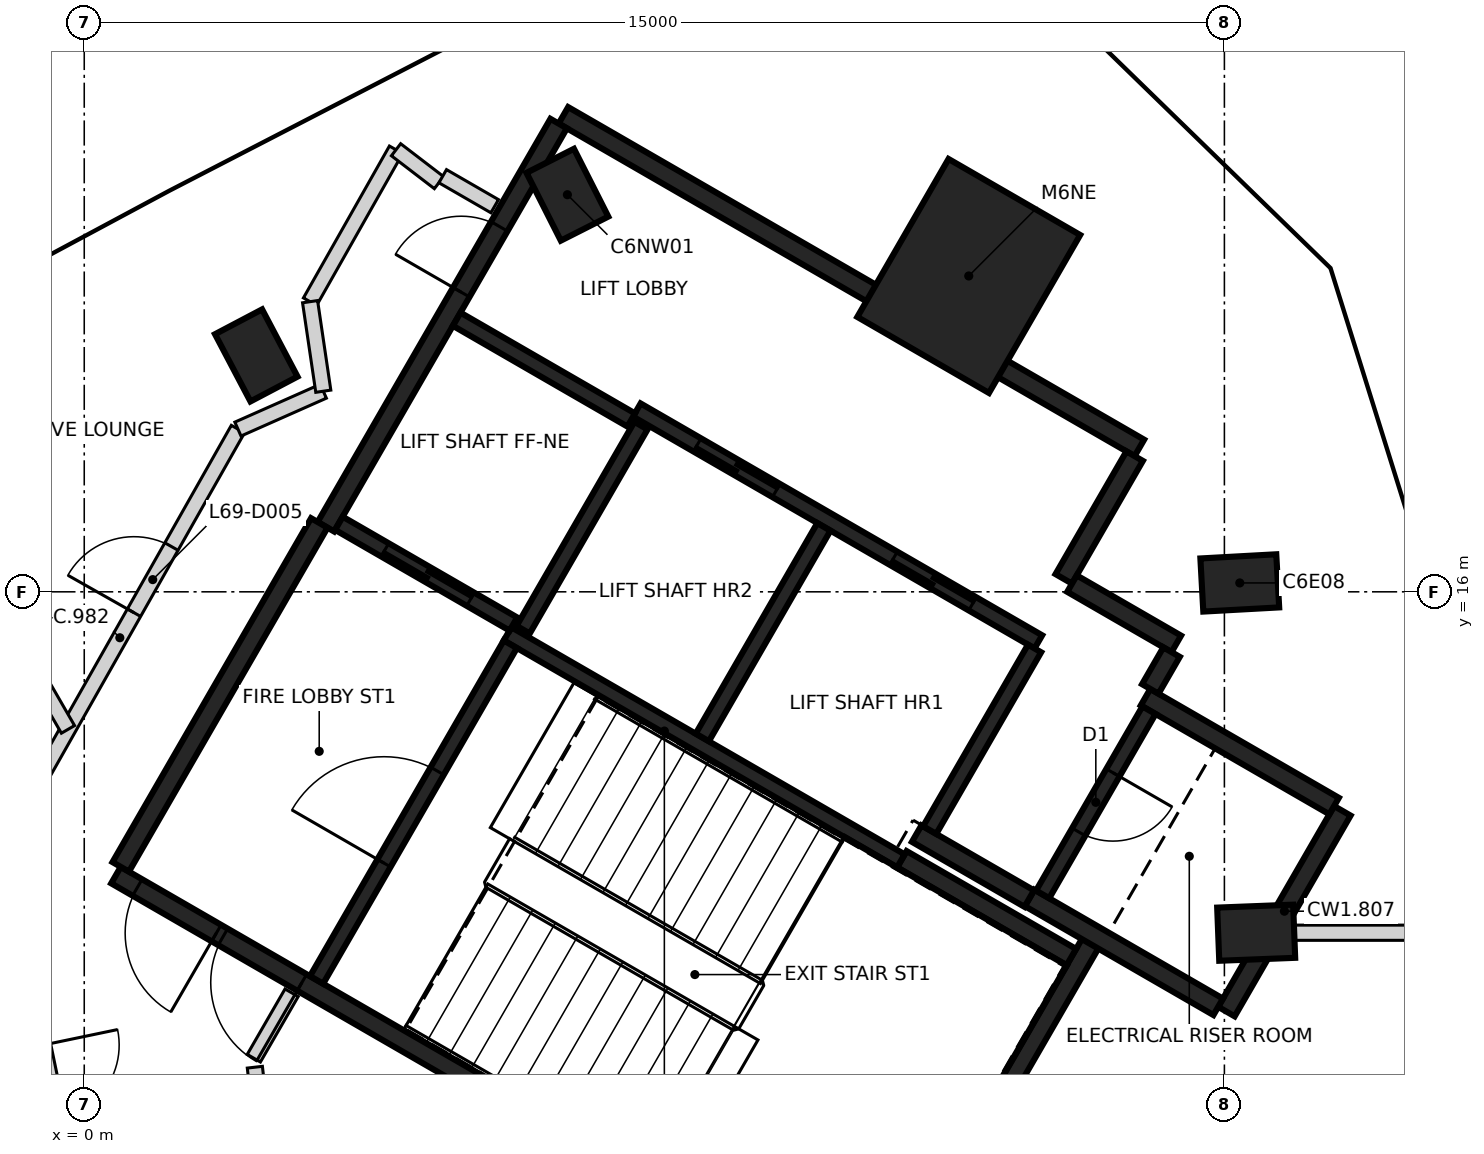
"""IFC4 building model, lengths in metres.
Left out: names, types, materials, properties, quantities, classifications, styles, units other than length and angle.
Written with IfcOpenShell. Run it as: python <this file> out.ifc"""

import sys

from ifc_helpers import new_model, si_unit, direction, frame, frame_2d, origin, origin_2d, place, context, subcontext, project, spatial, rectangle, extrude, element, fill, save


model = new_model("IFC4")
c1 = context("Model", 3, precision=1e-05, world=origin(), true_north=direction((0.0, 1.0)))
c2 = subcontext(c1, "Body", "Model", "MODEL_VIEW")
j1 = project(units=[si_unit("LENGTHUNIT", "METRE"), si_unit("PLANEANGLEUNIT", "RADIAN")], contexts=[c1])
p1 = place(None, origin())
s1 = spatial("IfcSite", under=j1, at=p1, CompositionType="ELEMENT")
p2 = place(p1, origin())
s2 = spatial("IfcBuilding", under=s1, at=p2, CompositionType="ELEMENT")
p3 = place(p2, frame((0.0, 0.0, 273.0)))
s3 = spatial("IfcBuildingStorey", under=s2, at=p3, CompositionType="ELEMENT", Elevation=273.0)
for number, where, z_axis, x_axis in (
    (1, (15.418, 11.515, -0.35), (0.0, 0.0, 1.0), (0.999, 0.039, 0.0)),
    (2, (15.202, 16.117, -0.35), (0.0, 0.0, 1.0), (0.998, 0.055, 0.0)),
    (3, (6.356, 21.224, -0.35), (0.0, 0.0, 1.0), (-0.452, 0.892, 0.0)),
    (4, (2.263, 19.11, -0.35), (0.0, 0.0, 1.0), (-0.466, 0.885, 0.0)),
):
    element("IfcColumn", number, at=place(p3, frame(where, z_axis=z_axis, x_axis=x_axis)), inside=s3, PredefinedType="COLUMN", context=c2, shape_type="SweptSolid", body=[
        extrude(rectangle(XDim=1.0, YDim=0.7, at=origin_2d()), origin(), (0.0, 0.0, 1.0), 3.6),
    ])
p4 = place(p3, frame((11.637, 20.155, -0.35), z_axis=(0.0, 0.0, 1.0), x_axis=(0.5, 0.866025403784, 0.0)))
e5 = element("IfcColumn", 5, at=p4, inside=s3, PredefinedType="COLUMN", context=c2, shape_type="SweptSolid", body=[
    extrude(rectangle(XDim=2.4, YDim=2.0, at=origin_2d()), origin(), (0.0, 0.0, 1.0), 3.6),
])
p5 = place(p3, frame((10.42, 6.498, 0.0), z_axis=(0.0, 0.0, 1.0), x_axis=(-0.866021906294, 0.500006057782, 0.0)))
e6 = element("IfcWall", 6, at=p5, inside=s3, PredefinedType="SHEAR", context=c2, shape_type="SweptSolid", body=[
    extrude(rectangle(XDim=11.55, YDim=0.25, at=frame_2d((5.775, 0.0))), origin(), (0.0, 0.0, 1.0), 3.25),
])
p6 = place(p5, frame((10.025, 0.0, 0.0)))
e7 = element("IfcOpeningElement", 7, at=p6, cuts=e6, PredefinedType="OPENING", context=c2, shape_type="SweptSolid", body=[
    extrude(rectangle(XDim=1.2, YDim=2.1, at=frame_2d((0.6, 1.05))), frame((0.0, 0.135, 0.0), z_axis=(0.0, -1.0, 0.0), x_axis=(1.0, 0.0, 0.0)), (0.0, 0.0, 1.0), 0.27),
])
p7 = place(p5, frame((8.725, 0.0, 0.0)))
e8 = element("IfcOpeningElement", 8, at=p7, cuts=e6, PredefinedType="OPENING", context=c2, shape_type="SweptSolid", body=[
    extrude(rectangle(XDim=1.2, YDim=2.1, at=frame_2d((0.6, 1.05))), frame((0.0, 0.135, 0.0), z_axis=(0.0, -1.0, 0.0), x_axis=(1.0, 0.0, 0.0)), (0.0, 0.0, 1.0), 0.27),
])
p8 = place(p3, frame((6.304, 22.269, 0.0), z_axis=(0.0, 0.0, 1.0), x_axis=(0.866022959057, -0.500004234368, 0.0)))
e9 = element("IfcWall", 9, at=p8, inside=s3, PredefinedType="SHEAR", context=c2, shape_type="SweptSolid", body=[
    extrude(rectangle(XDim=8.75, YDim=0.25, at=frame_2d((4.375, 0.0))), origin(), (0.0, 0.0, 1.0), 3.25),
])
p9 = place(p3, frame((3.179, 16.856, 0.0), z_axis=(0.0, 0.0, 1.0), x_axis=(0.500001955336, 0.866024274868, 0.0)))
e10 = element("IfcWall", 10, at=p9, inside=s3, PredefinedType="SHEAR", context=c2, shape_type="SweptSolid", body=[
    extrude(rectangle(XDim=6.125, YDim=0.25, at=frame_2d((3.062, 0.0))), origin(), (0.0, 0.0, 1.0), 3.25),
])
p10 = place(p9, frame((3.563, 0.0, 0.0)))
e11 = element("IfcOpeningElement", 11, at=p10, cuts=e10, PredefinedType="OPENING", context=c2, shape_type="SweptSolid", body=[
    extrude(rectangle(XDim=1.0, YDim=2.1, at=frame_2d((0.5, 1.05))), frame((0.0, 0.135, 0.0), z_axis=(0.0, -1.0, 0.0), x_axis=(1.0, 0.0, 0.0)), (0.0, 0.0, 1.0), 0.27),
])
p11 = place(p3, frame((0.48, 12.381, 0.0), z_axis=(0.0, 0.0, 1.0), x_axis=(0.49999885962, 0.866026062182, 0.0)))
e12 = element("IfcWall", 12, at=p11, inside=s3, PredefinedType="SHEAR", context=c2, shape_type="SweptSolid", body=[
    extrude(rectangle(XDim=5.225, YDim=0.25, at=frame_2d((2.612, 0.0))), origin(), (0.0, 0.0, 1.0), 3.25),
])
p12 = place(p3, frame((13.238, 11.378, 0.0), z_axis=(0.0, 0.0, 1.0), x_axis=(-0.500008851346, -0.866020293397, 0.0)))
e13 = element("IfcWall", 13, at=p12, inside=s3, PredefinedType="SHEAR", context=c2, shape_type="SweptSolid", body=[
    extrude(rectangle(XDim=5.51, YDim=0.25, at=frame_2d((2.755, 0.0))), origin(), (0.0, 0.0, 1.0), 3.25),
])
p13 = place(p3, frame((16.552, 13.119, 0.0), z_axis=(0.0, 0.0, 1.0), x_axis=(-0.499978833458, -0.866037623948, 0.0)))
e14 = element("IfcWall", 14, at=p13, inside=s3, PredefinedType="SHEAR", context=c2, shape_type="SweptSolid", body=[
    extrude(rectangle(XDim=3.05, YDim=0.25, at=frame_2d((1.525, 0.0))), origin(), (0.0, 0.0, 1.0), 3.25),
])
p14 = place(p3, frame((14.918, 10.54, 0.0), z_axis=(0.0, 0.0, 1.0), x_axis=(-0.866063538972, 0.499933942099, 0.0)))
e15 = element("IfcWall", 15, at=p14, inside=s3, PredefinedType="SHEAR", context=c2, shape_type="SweptSolid", body=[
    extrude(rectangle(XDim=2.865, YDim=0.25, at=frame_2d((1.432, 0.0))), origin(), (0.0, 0.0, 1.0), 3.25),
])
p15 = place(p3, frame((13.963, 14.614, 0.0), z_axis=(0.0, 0.0, 1.0), x_axis=(0.866042235819, -0.499970844928, 0.0)))
e16 = element("IfcWall", 16, at=p15, inside=s3, PredefinedType="SHEAR", context=c2, shape_type="SweptSolid", body=[
    extrude(rectangle(XDim=2.865, YDim=0.25, at=frame_2d((1.432, 0.0))), origin(), (0.0, 0.0, 1.0), 3.25),
])
p16 = place(p3, frame((10.757, 12.481, 0.0), z_axis=(0.0, 0.0, 1.0), x_axis=(0.866022940537, -0.500004266446, 0.0)))
e17 = element("IfcWall", 17, at=p16, inside=s3, PredefinedType="SHEAR", context=c2, shape_type="SweptSolid", body=[
    extrude(rectangle(XDim=2.575, YDim=0.25, at=frame_2d((1.287, 0.0))), origin(), (0.0, 0.0, 1.0), 3.25),
])
p17 = place(p3, frame((13.819, 17.785, 0.0), z_axis=(0.0, 0.0, 1.0), x_axis=(-0.500039802285, -0.866002422705, 0.0)))
e18 = element("IfcWall", 18, at=p17, inside=s3, PredefinedType="SHEAR", context=c2, shape_type="SweptSolid", body=[
    extrude(rectangle(XDim=1.865, YDim=0.25, at=frame_2d((0.932, 0.0))), origin(), (0.0, 0.0, 1.0), 3.25),
])
p18 = place(p3, frame((12.433, 11.964, 0.0), z_axis=(0.0, 0.0, 1.0), x_axis=(-0.866038183914, 0.499977863513, 0.0)))
e19 = element("IfcWall", 19, at=p18, inside=s3, PredefinedType="SHEAR", context=c2, shape_type="SweptSolid", body=[
    extrude(rectangle(XDim=1.71, YDim=0.25, at=frame_2d((0.855, 0.0))), origin(), (0.0, 0.0, 1.0), 3.25),
])
p19 = place(p3, frame((12.995, 16.108, 0.0), z_axis=(0.0, 0.0, 1.0), x_axis=(0.866044474677, -0.49996696679, 0.0)))
e20 = element("IfcWall", 20, at=p19, inside=s3, PredefinedType="SHEAR", context=c2, shape_type="SweptSolid", body=[
    extrude(rectangle(XDim=1.584, YDim=0.25, at=frame_2d((0.792, 0.0))), origin(), (0.0, 0.0, 1.0), 3.25),
])
p20 = place(p3, frame((14.305, 15.207, 0.0), z_axis=(0.0, 0.0, 1.0), x_axis=(-0.499848422343, -0.866112899501, 0.0)))
e21 = element("IfcWall", 21, at=p20, inside=s3, PredefinedType="SHEAR", context=c2, shape_type="SweptSolid", body=[
    extrude(rectangle(XDim=0.559, YDim=0.25, at=frame_2d((0.28, 0.0))), origin(), (0.0, 0.0, 1.0), 3.25),
])
p21 = place(p3, frame((12.552, 15.342, 0.0), z_axis=(0.0, 0.0, 1.0), x_axis=(-0.866030299012, 0.499991521122, 0.0)))
e22 = element("IfcWall", 22, at=p21, inside=s3, PredefinedType="SHEAR", context=c2, shape_type="SweptSolid", body=[
    extrude(rectangle(XDim=6.1, YDim=0.2, at=frame_2d((3.05, 0.0))), origin(), (0.0, 0.0, 1.0), 3.25),
])
p22 = place(p21, frame((1.0, 0.0, 0.0)))
e23 = element("IfcOpeningElement", 23, at=p22, cuts=e22, PredefinedType="OPENING", context=c2, shape_type="SweptSolid", body=[
    extrude(rectangle(XDim=1.2, YDim=2.1, at=frame_2d((0.6, 1.05))), frame((0.0, 0.11, 0.0), z_axis=(0.0, -1.0, 0.0), x_axis=(1.0, 0.0, 0.0)), (0.0, 0.0, 1.0), 0.22),
])
p23 = place(p21, frame((3.982, 0.0, 0.0)))
e24 = element("IfcOpeningElement", 24, at=p23, cuts=e22, PredefinedType="OPENING", context=c2, shape_type="SweptSolid", body=[
    extrude(rectangle(XDim=1.2, YDim=2.1, at=frame_2d((0.6, 1.05))), frame((0.0, 0.11, 0.0), z_axis=(0.0, -1.0, 0.0), x_axis=(1.0, 0.0, 0.0)), (0.0, 0.0, 1.0), 0.22),
])
p24 = place(p3, frame((10.743, 12.46, 0.0), z_axis=(0.0, 0.0, 1.0), x_axis=(-0.866018848283, 0.500011354289, 0.0)))
e25 = element("IfcWall", 25, at=p24, inside=s3, PredefinedType="SHEAR", context=c2, shape_type="SweptSolid", body=[
    extrude(rectangle(XDim=5.974, YDim=0.2, at=frame_2d((2.987, 0.0))), origin(), (0.0, 0.0, 1.0), 3.25),
])
p25 = place(p3, frame((3.057, 10.895, 0.0), z_axis=(0.0, 0.0, 1.0), x_axis=(0.500027839223, 0.866009330205, 0.0)))
e26 = element("IfcWall", 26, at=p25, inside=s3, PredefinedType="SHEAR", context=c2, shape_type="SweptSolid", body=[
    extrude(rectangle(XDim=5.098, YDim=0.2, at=frame_2d((2.549, 0.0))), origin(), (0.0, 0.0, 1.0), 3.25),
])
p26 = place(p25, frame((1.774, 0.0, 0.0)))
e27 = element("IfcOpeningElement", 27, at=p26, cuts=e26, PredefinedType="OPENING", context=c2, shape_type="SweptSolid", body=[
    extrude(rectangle(XDim=1.4, YDim=2.1, at=frame_2d((0.7, 1.05))), frame((0.0, 0.11, 0.0), z_axis=(0.0, -1.0, 0.0), x_axis=(1.0, 0.0, 0.0)), (0.0, 0.0, 1.0), 0.22),
])
p27 = place(p3, frame((8.132, 14.084, 0.0), z_axis=(0.0, 0.0, 1.0), x_axis=(0.500030834389, 0.86600760081, 0.0)))
e28 = element("IfcWall", 28, at=p27, inside=s3, PredefinedType="SHEAR", context=c2, shape_type="SweptSolid", body=[
    extrude(rectangle(XDim=3.198, YDim=0.2, at=frame_2d((1.599, 0.0))), origin(), (0.0, 0.0, 1.0), 3.25),
])
p28 = place(p3, frame((14.008, 14.442, 0.0), z_axis=(0.0, 0.0, 1.0), x_axis=(-0.499986818241, -0.866033014143, 0.0)))
e29 = element("IfcWall", 29, at=p28, inside=s3, PredefinedType="SHEAR", context=c2, shape_type="SweptSolid", body=[
    extrude(rectangle(XDim=2.798, YDim=0.2, at=frame_2d((1.399, 0.0))), origin(), (0.0, 0.0, 1.0), 3.25),
])
p29 = place(p28, frame((0.949, 0.0, 0.0)))
e30 = element("IfcOpeningElement", 30, at=p29, cuts=e29, PredefinedType="OPENING", context=c2, shape_type="SweptSolid", body=[
    extrude(rectangle(XDim=0.9, YDim=2.1, at=frame_2d((0.45, 1.05))), frame((0.0, 0.11, 0.0), z_axis=(0.0, -1.0, 0.0), x_axis=(1.0, 0.0, 0.0)), (0.0, 0.0, 1.0), 0.22),
])
p30 = place(p3, frame((12.502, 15.255, 0.0), z_axis=(0.0, 0.0, 1.0), x_axis=(-0.499965018551, -0.866045599391, 0.0)))
e31 = element("IfcWall", 31, at=p30, inside=s3, PredefinedType="SHEAR", context=c2, shape_type="SweptSolid", body=[
    extrude(rectangle(XDim=2.759, YDim=0.2, at=frame_2d((1.379, 0.0))), origin(), (0.0, 0.0, 1.0), 3.25),
])
p31 = place(p3, frame((7.324, 18.187, 0.0), z_axis=(0.0, 0.0, 1.0), x_axis=(-0.499967891604, -0.866043940782, 0.0)))
e32 = element("IfcWall", 32, at=p31, inside=s3, PredefinedType="SHEAR", context=c2, shape_type="SweptSolid", body=[
    extrude(rectangle(XDim=3.1, YDim=0.2, at=frame_2d((1.55, 0.0))), origin(), (0.0, 0.0, 1.0), 3.25),
])
p32 = place(p3, frame((5.646, 15.576, 0.0), z_axis=(0.0, 0.0, 1.0), x_axis=(-0.866018407898, 0.500012117035, 0.0)))
e33 = element("IfcWall", 33, at=p32, inside=s3, PredefinedType="SHEAR", context=c2, shape_type="SweptSolid", body=[
    extrude(rectangle(XDim=2.651, YDim=0.2, at=frame_2d((1.325, 0.0))), origin(), (0.0, 0.0, 1.0), 3.25),
])
p33 = place(p32, frame((0.652, 0.0, 0.0)))
e34 = element("IfcOpeningElement", 34, at=p33, cuts=e33, PredefinedType="OPENING", context=c2, shape_type="SweptSolid", body=[
    extrude(rectangle(XDim=1.3, YDim=2.1, at=frame_2d((0.65, 1.05))), frame((0.0, 0.11, 0.0), z_axis=(0.0, -1.0, 0.0), x_axis=(1.0, 0.0, 0.0)), (0.0, 0.0, 1.0), 0.22),
])
p34 = place(p3, frame((7.196, 18.26, 0.0), z_axis=(0.0, 0.0, 1.0), x_axis=(-0.866018407898, 0.500012117035, 0.0)))
e35 = element("IfcWall", 35, at=p34, inside=s3, PredefinedType="SHEAR", context=c2, shape_type="SweptSolid", body=[
    extrude(rectangle(XDim=2.651, YDim=0.2, at=frame_2d((1.325, 0.0))), origin(), (0.0, 0.0, 1.0), 3.25),
])
p35 = place(p3, frame((-1.086, 12.65, 0.0), z_axis=(0.0, 0.0, 1.0), x_axis=(0.492563383526, 0.870276572826, 0.0)))
e36 = element("IfcWall", 36, at=p35, inside=s3, PredefinedType="PARTITIONING", context=c2, shape_type="SweptSolid", body=[
    extrude(rectangle(XDim=6.309, YDim=0.2, at=frame_2d((3.155, 0.0))), origin(), (0.0, 0.0, 1.0), 3.25),
])
p36 = place(p35, frame((3.533, 0.0, 0.0)))
e37 = element("IfcOpeningElement", 37, at=p36, cuts=e36, PredefinedType="OPENING", context=c2, shape_type="SweptSolid", body=[
    extrude(rectangle(XDim=1.0, YDim=2.1, at=frame_2d((0.5, 1.05))), frame((0.0, 0.11, 0.0), z_axis=(0.0, -1.0, 0.0), x_axis=(1.0, 0.0, 0.0)), (0.0, 0.0, 1.0), 0.22),
])
p37 = place(p3, frame((-1.085, 12.65, 0.0), z_axis=(0.0, 0.0, 1.0), x_axis=(0.203998862084, -0.97897112535, 0.0)))
e38 = element("IfcWall", 38, at=p37, inside=s3, PredefinedType="PARTITIONING", context=c2, shape_type="SweptSolid", body=[
    extrude(rectangle(XDim=6.338, YDim=0.2, at=frame_2d((3.169, 0.0))), origin(), (0.0, 0.0, 1.0), 3.25),
])
p38 = place(p37, frame((2.669, 0.0, 0.0)))
e39 = element("IfcOpeningElement", 39, at=p38, cuts=e38, PredefinedType="OPENING", context=c2, shape_type="SweptSolid", body=[
    extrude(rectangle(XDim=1.0, YDim=2.1, at=frame_2d((0.5, 1.05))), frame((0.0, 0.11, 0.0), z_axis=(0.0, -1.0, 0.0), x_axis=(1.0, 0.0, 0.0)), (0.0, 0.0, 1.0), 0.22),
])
p39 = place(p3, frame((2.022, 18.141, 0.0), z_axis=(0.0, 0.0, 1.0), x_axis=(0.914212683456, 0.405234709036, 0.0)))
e40 = element("IfcWall", 40, at=p39, inside=s3, PredefinedType="PARTITIONING", context=c2, shape_type="SweptSolid", body=[
    extrude(rectangle(XDim=1.229, YDim=0.2, at=frame_2d((0.614, 0.0))), origin(), (0.0, 0.0, 1.0), 3.25),
])
p40 = place(p3, frame((2.592, 6.719, 0.0), z_axis=(0.0, 0.0, 1.0), x_axis=(-0.114027951455, 0.993477541914, 0.0)))
e41 = element("IfcWall", 41, at=p40, inside=s3, PredefinedType="PARTITIONING", context=c2, shape_type="SweptSolid", body=[
    extrude(rectangle(XDim=3.047, YDim=0.2, at=frame_2d((1.523, 0.0))), origin(), (0.0, 0.0, 1.0), 3.25),
])
p41 = place(p40, frame((1.083, 0.0, 0.0)))
e42 = element("IfcOpeningElement", 42, at=p41, cuts=e41, PredefinedType="OPENING", context=c2, shape_type="SweptSolid", body=[
    extrude(rectangle(XDim=1.0, YDim=2.1, at=frame_2d((0.5, 1.05))), frame((0.0, 0.11, 0.0), z_axis=(0.0, -1.0, 0.0), x_axis=(1.0, 0.0, 0.0)), (0.0, 0.0, 1.0), 0.22),
])
p42 = place(p3, frame((2.231, 9.864, 0.0), z_axis=(0.0, 0.0, 1.0), x_axis=(0.499942098031, 0.866058830921, 0.0)))
e43 = element("IfcWall", 43, at=p42, inside=s3, PredefinedType="PARTITIONING", context=c2, shape_type="SweptSolid", body=[
    extrude(rectangle(XDim=0.994, YDim=0.2, at=frame_2d((0.497, 0.0))), origin(), (0.0, 0.0, 1.0), 3.25),
])
p43 = place(p3, frame((2.971, 19.817, 0.0), z_axis=(0.0, 0.0, 1.0), x_axis=(0.492596700535, 0.870257715061, 0.0)))
e44 = element("IfcWall", 44, at=p43, inside=s3, PredefinedType="PARTITIONING", context=c2, shape_type="SweptSolid", body=[
    extrude(rectangle(XDim=2.296, YDim=0.2, at=frame_2d((1.148, 0.0))), origin(), (0.0, 0.0, 1.0), 3.25),
])
p44 = place(p3, frame((2.971, 19.817, 0.0), z_axis=(0.0, 0.0, 1.0), x_axis=(0.146184555477, -0.989257335449, 0.0)))
e45 = element("IfcWall", 45, at=p44, inside=s3, PredefinedType="PARTITIONING", context=c2, shape_type="SweptSolid", body=[
    extrude(rectangle(XDim=1.191, YDim=0.2, at=frame_2d((0.595, 0.0))), origin(), (0.0, 0.0, 1.0), 2.35),
])
p45 = place(p3, frame((4.102, 21.816, 0.0), z_axis=(0.0, 0.0, 1.0), x_axis=(0.793783006464, -0.608201067615, 0.0)))
e46 = element("IfcWall", 46, at=p45, inside=s3, PredefinedType="PARTITIONING", context=c2, shape_type="SweptSolid", body=[
    extrude(rectangle(XDim=0.712, YDim=0.2, at=frame_2d((0.356, 0.0))), origin(), (0.0, 0.0, 1.0), 3.25),
])
p46 = place(p3, frame((4.716, 21.468, 0.0), z_axis=(0.0, 0.0, 1.0), x_axis=(0.865912682783, -0.500195187698, 0.0)))
e47 = element("IfcWall", 47, at=p46, inside=s3, PredefinedType="PARTITIONING", context=c2, shape_type="SweptSolid", body=[
    extrude(rectangle(XDim=0.79, YDim=0.2, at=frame_2d((0.395, 0.0))), origin(), (0.0, 0.0, 1.0), 3.25),
])
p47 = place(p3, frame((-3.02, 19.05, 0.0), z_axis=(0.0, 0.0, 1.0), x_axis=(0.499943402613, -0.866058077835, 0.0)))
e48 = element("IfcWall", 48, at=p47, inside=s3, PredefinedType="PARTITIONING", context=c2, shape_type="SweptSolid", body=[
    extrude(rectangle(XDim=5.612, YDim=0.2, at=frame_2d((2.806, 0.0))), origin(), (0.0, 0.0, 1.0), 3.25),
])
p48 = place(p3, frame((15.84, 11.515, 0.0), z_axis=(0.0, 0.0, 1.0), x_axis=(1.0, 0.0, 0.0)))
e49 = element("IfcWall", 49, at=p48, inside=s3, PredefinedType="PARTITIONING", context=c2, shape_type="SweptSolid", body=[
    extrude(rectangle(XDim=2.025, YDim=0.2, at=frame_2d((1.012, 0.0))), origin(), (0.0, 0.0, 1.0), 3.25),
])
p49 = place(p33, origin())
e50 = element("IfcDoor", 50, at=p49, inside=s3, OperationType="SLIDING_TO_RIGHT", PredefinedType="DOOR", context=c2, shape_type="SweptSolid", body=[
    extrude(rectangle(XDim=1.3, YDim=2.1, at=frame_2d((0.65, 1.05))), frame((0.0, 0.025, 0.0), z_axis=(0.0, -1.0, 0.0), x_axis=(1.0, 0.0, 0.0)), (0.0, 0.0, 1.0), 0.05),
])
fill(e34, e50)
p50 = place(p22, origin())
e51 = element("IfcDoor", 51, at=p50, inside=s3, OperationType="DOUBLE_DOOR_SLIDING", PredefinedType="DOOR", context=c2, shape_type="SweptSolid", body=[
    extrude(rectangle(XDim=1.2, YDim=2.1, at=frame_2d((0.6, 1.05))), frame((0.0, 0.025, 0.0), z_axis=(0.0, -1.0, 0.0), x_axis=(1.0, 0.0, 0.0)), (0.0, 0.0, 1.0), 0.05),
])
fill(e23, e51)
p51 = place(p23, origin())
e52 = element("IfcDoor", 52, at=p51, inside=s3, OperationType="DOUBLE_DOOR_SLIDING", PredefinedType="DOOR", context=c2, shape_type="SweptSolid", body=[
    extrude(rectangle(XDim=1.2, YDim=2.1, at=frame_2d((0.6, 1.05))), frame((0.0, 0.025, 0.0), z_axis=(0.0, -1.0, 0.0), x_axis=(1.0, 0.0, 0.0)), (0.0, 0.0, 1.0), 0.05),
])
fill(e24, e52)
p52 = place(p10, origin())
e53 = element("IfcDoor", 53, at=p52, inside=s3, OperationType="SINGLE_SWING_LEFT", PredefinedType="DOOR", context=c2, shape_type="SweptSolid", body=[
    extrude(rectangle(XDim=1.0, YDim=2.1, at=frame_2d((0.5, 1.05))), frame((0.0, 0.025, 0.0), z_axis=(0.0, -1.0, 0.0), x_axis=(1.0, 0.0, 0.0)), (0.0, 0.0, 1.0), 0.05),
])
fill(e11, e53)
p53 = place(p6, origin())
e54 = element("IfcDoor", 54, at=p53, inside=s3, OperationType="SINGLE_SWING_LEFT", PredefinedType="DOOR", context=c2, shape_type="SweptSolid", body=[
    extrude(rectangle(XDim=1.2, YDim=2.1, at=frame_2d((0.6, 1.05))), frame((0.0, 0.025, 0.0), z_axis=(0.0, -1.0, 0.0), x_axis=(1.0, 0.0, 0.0)), (0.0, 0.0, 1.0), 0.05),
])
fill(e7, e54)
p54 = place(p7, origin())
e55 = element("IfcDoor", 55, at=p54, inside=s3, OperationType="SINGLE_SWING_RIGHT", PredefinedType="DOOR", context=c2, shape_type="SweptSolid", body=[
    extrude(rectangle(XDim=1.2, YDim=2.1, at=frame_2d((0.6, 1.05))), frame((0.0, 0.025, 0.0), z_axis=(0.0, -1.0, 0.0), x_axis=(1.0, 0.0, 0.0)), (0.0, 0.0, 1.0), 0.05),
])
fill(e8, e55)
p55 = place(p26, origin())
e56 = element("IfcDoor", 56, at=p55, inside=s3, OperationType="SINGLE_SWING_RIGHT", PredefinedType="DOOR", context=c2, shape_type="SweptSolid", body=[
    extrude(rectangle(XDim=1.4, YDim=2.1, at=frame_2d((0.7, 1.05))), frame((0.0, 0.025, 0.0), z_axis=(0.0, -1.0, 0.0), x_axis=(1.0, 0.0, 0.0)), (0.0, 0.0, 1.0), 0.05),
])
fill(e27, e56)
p56 = place(p29, origin())
e57 = element("IfcDoor", 57, at=p56, inside=s3, OperationType="SINGLE_SWING_LEFT", PredefinedType="DOOR", context=c2, shape_type="SweptSolid", body=[
    extrude(rectangle(XDim=0.9, YDim=2.1, at=frame_2d((0.45, 1.05))), frame((0.0, 0.025, 0.0), z_axis=(0.0, -1.0, 0.0), x_axis=(1.0, 0.0, 0.0)), (0.0, 0.0, 1.0), 0.05),
])
fill(e30, e57)
p57 = place(p36, frame((1.0, 0.0, 0.0), z_axis=(0.0, 0.0, 1.0), x_axis=(-1.0, 0.0, 0.0)))
e58 = element("IfcDoor", 58, at=p57, inside=s3, OperationType="SINGLE_SWING_LEFT", PredefinedType="DOOR", context=c2, shape_type="SweptSolid", body=[
    extrude(rectangle(XDim=1.0, YDim=2.1, at=frame_2d((0.5, 1.05))), frame((0.0, 0.025, 0.0), z_axis=(0.0, -1.0, 0.0), x_axis=(1.0, 0.0, 0.0)), (0.0, 0.0, 1.0), 0.05),
])
fill(e37, e58)
p58 = place(p38, frame((1.0, 0.0, 0.0), z_axis=(0.0, 0.0, 1.0), x_axis=(-1.0, 0.0, 0.0)))
e59 = element("IfcDoor", 59, at=p58, inside=s3, OperationType="SINGLE_SWING_LEFT", PredefinedType="DOOR", context=c2, shape_type="SweptSolid", body=[
    extrude(rectangle(XDim=1.0, YDim=2.1, at=frame_2d((0.5, 1.05))), frame((0.0, 0.025, 0.0), z_axis=(0.0, -1.0, 0.0), x_axis=(1.0, 0.0, 0.0)), (0.0, 0.0, 1.0), 0.05),
])
fill(e39, e59)
save(model, sys.argv[1])
